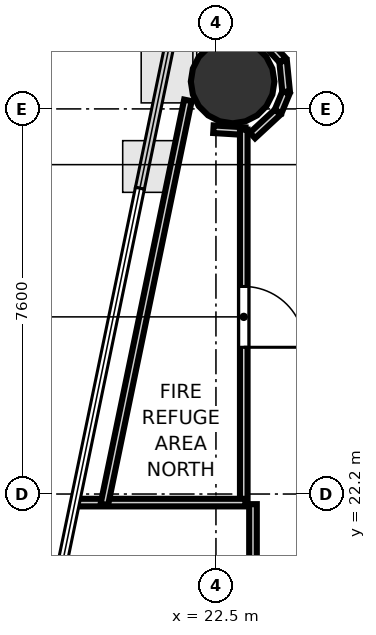
"""IFC4 building model, lengths in metres.
Left out: names, types, materials, properties, quantities, classifications, styles, units other than length and angle.
Written with IfcOpenShell. Run it as: python <this file> out.ifc"""

import sys

from ifc_helpers import new_model, si_unit, direction, frame, frame_2d, origin, origin_2d, place, context, subcontext, project, spatial, rectangle, hollow_circle, extrude, element, fill, save


model = new_model("IFC4")
c1 = context("Model", 3, precision=1e-05, world=origin(), true_north=direction((0.0, 1.0)))
c2 = subcontext(c1, "Body", "Model", "MODEL_VIEW")
j1 = project(units=[si_unit("LENGTHUNIT", "METRE"), si_unit("PLANEANGLEUNIT", "RADIAN")], contexts=[c1])
p1 = place(None, origin())
s1 = spatial("IfcSite", under=j1, at=p1, CompositionType="ELEMENT")
p2 = place(p1, origin())
s2 = spatial("IfcBuilding", under=s1, at=p2, CompositionType="ELEMENT")
p3 = place(p2, frame((0.0, 0.0, 93.2)))
s3 = spatial("IfcBuildingStorey", under=s2, at=p3, CompositionType="ELEMENT", Elevation=93.2)
p4 = place(p3, frame((22.829, 30.34, 0.0), z_axis=(0.0, 0.0, 1.0), x_axis=(1.0, 0.0, 0.0)))
e1 = element("IfcColumn", 1, at=p4, inside=s3, PredefinedType="COLUMN", context=c2, shape_type="SweptSolid", body=[
    extrude(hollow_circle(Radius=0.825, WallThickness=0.04, at=origin_2d()), origin(), (0.0, 0.0, 1.0), 4.6),
])
p5 = place(p3, frame((22.45, 29.399, 0.0), z_axis=(0.0, 0.0, 1.0), x_axis=(0.998165654987, -0.060541929307, 0.0)))
e2 = element("IfcWall", 2, at=p5, inside=s3, PredefinedType="PARTITIONING", context=c2, shape_type="SweptSolid", body=[
    extrude(rectangle(XDim=0.629, YDim=0.15, at=frame_2d((0.314, 0.0))), origin(), (0.0, 0.0, 1.0), 2.94),
])
p6 = place(p3, frame((23.049, 29.392, 0.0), z_axis=(0.0, 0.0, 1.0), x_axis=(0.0, -1.0, 0.0)))
e3 = element("IfcWall", 3, at=p6, inside=s3, PredefinedType="PARTITIONING", context=c2, shape_type="SweptSolid", body=[
    extrude(rectangle(XDim=7.392, YDim=0.15, at=frame_2d((3.696, 0.0))), origin(), (0.0, 0.0, 1.0), 2.94),
])
p7 = place(p6, frame((3.096, 0.0, 0.0)))
e4 = element("IfcOpeningElement", 4, at=p7, cuts=e3, PredefinedType="OPENING", context=c2, shape_type="SweptSolid", body=[
    extrude(rectangle(XDim=1.2, YDim=2.15, at=frame_2d((0.6, 1.075))), frame((0.0, 0.085, 0.0), z_axis=(0.0, -1.0, 0.0), x_axis=(1.0, 0.0, 0.0)), (0.0, 0.0, 1.0), 0.17),
])
p8 = place(p3, frame((23.08, 22.031, 0.0), z_axis=(0.0, 0.0, 1.0), x_axis=(-1.0, 0.0, 0.0)))
e5 = element("IfcWall", 5, at=p8, inside=s3, PredefinedType="PARTITIONING", context=c2, shape_type="SweptSolid", body=[
    extrude(rectangle(XDim=3.383, YDim=0.15, at=frame_2d((1.692, 0.0))), origin(), (0.0, 0.0, 1.0), 2.94),
])
p9 = place(p3, frame((20.297, 21.994, 0.0), z_axis=(0.0, 0.0, 1.0), x_axis=(0.202453924761, 0.979291789177, 0.0)))
e6 = element("IfcWall", 6, at=p9, inside=s3, PredefinedType="PARTITIONING", context=c2, shape_type="SweptSolid", body=[
    extrude(rectangle(XDim=8.144, YDim=0.15, at=frame_2d((4.072, 0.0))), origin(), (0.0, 0.0, 1.0), 2.94),
])
p10 = place(p3, frame((23.727, 29.748, 0.0), z_axis=(0.0, 0.0, 1.0), x_axis=(0.382616209997, 0.923907374063, 0.0)))
e7 = element("IfcWall", 7, at=p10, inside=s3, PredefinedType="PARTITIONING", context=c2, shape_type="SweptSolid", body=[
    extrude(rectangle(XDim=0.408, YDim=0.15, at=frame_2d((0.204, 0.0))), origin(), (0.0, 0.0, 1.0), 2.94),
])
p11 = place(p3, frame((23.885, 30.139, 0.0), z_axis=(0.0, 0.0, 1.0), x_axis=(-0.0981888168, 0.995167803064, 0.0)))
e8 = element("IfcWall", 8, at=p11, inside=s3, PredefinedType="PARTITIONING", context=c2, shape_type="SweptSolid", body=[
    extrude(rectangle(XDim=0.607, YDim=0.15, at=frame_2d((0.303, 0.0))), origin(), (0.0, 0.0, 1.0), 2.94),
])
p12 = place(p3, frame((23.817, 30.761, 0.0), z_axis=(0.0, 0.0, 1.0), x_axis=(-0.679936833798, 0.733270688112, 0.0)))
e9 = element("IfcWall", 9, at=p12, inside=s3, PredefinedType="PARTITIONING", context=c2, shape_type="SweptSolid", body=[
    extrude(rectangle(XDim=0.874, YDim=0.15, at=frame_2d((0.437, 0.0))), origin(), (0.0, 0.0, 1.0), 2.94),
])
p13 = place(p3, frame((23.231, 13.842, 0.0), z_axis=(0.0, 0.0, 1.0), x_axis=(0.0, 1.0, 0.0)))
e10 = element("IfcWall", 10, at=p13, inside=s3, PredefinedType="PARTITIONING", context=c2, shape_type="SweptSolid", body=[
    extrude(rectangle(XDim=8.158, YDim=0.15, at=frame_2d((4.079, 0.0))), origin(), (0.0, 0.0, 1.0), 2.94),
])
p14 = place(p3, frame((23.221, 29.276, 0.0), z_axis=(0.0, 0.0, 1.0), x_axis=(0.734278838715, 0.678847985204, 0.0)))
e11 = element("IfcWall", 11, at=p14, inside=s3, PredefinedType="PARTITIONING", context=c2, shape_type="SweptSolid", body=[
    extrude(rectangle(XDim=0.678, YDim=0.15, at=frame_2d((0.339, 0.0))), origin(), (0.0, 0.0, 1.0), 2.94),
])
p15 = place(p7, origin())
e12 = element("IfcDoor", 12, at=p15, inside=s3, OperationType="SINGLE_SWING_RIGHT", PredefinedType="DOOR", context=c2, shape_type="SweptSolid", body=[
    extrude(rectangle(XDim=1.2, YDim=2.15, at=frame_2d((0.6, 1.075))), frame((0.0, 0.025, 0.0), z_axis=(0.0, -1.0, 0.0), x_axis=(1.0, 0.0, 0.0)), (0.0, 0.0, 1.0), 0.05),
])
fill(e4, e12)
save(model, sys.argv[1])
